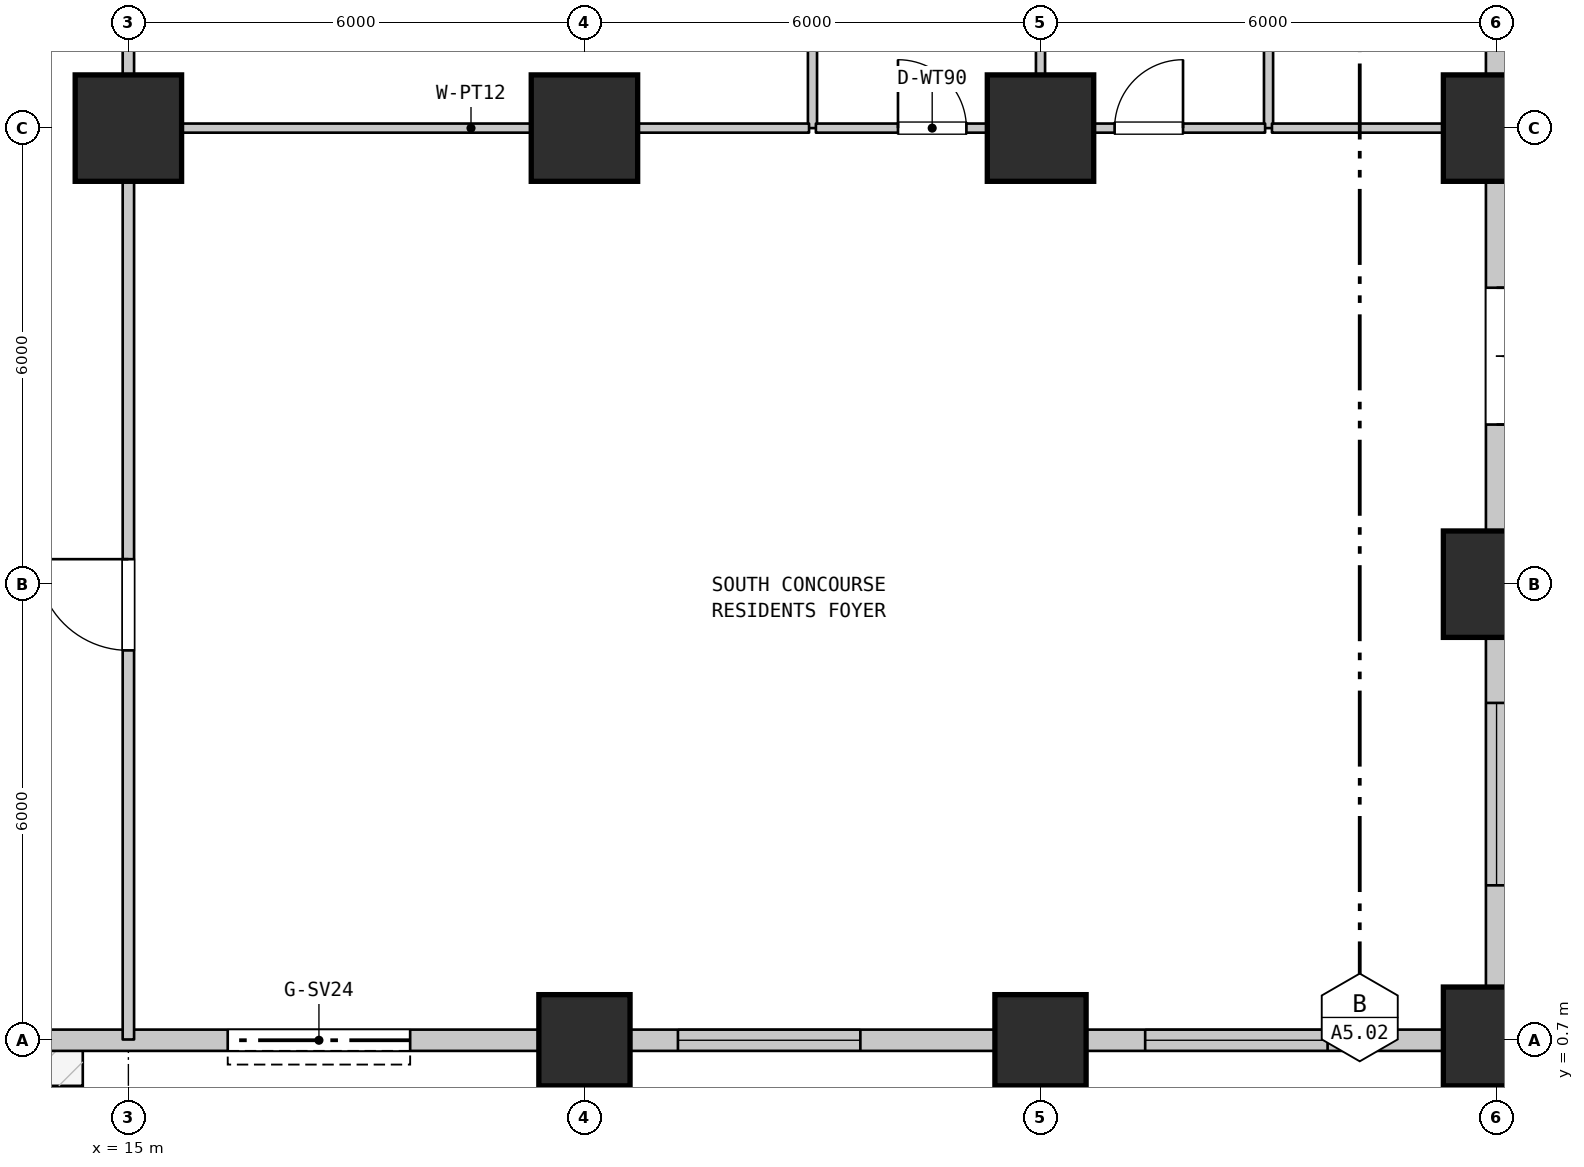
"""IFC4 building model, lengths in metres.
Left out: names, types, materials, properties, quantities, classifications, styles, units other than length and angle.
Written with IfcOpenShell. Run it as: python <this file> out.ifc"""

import sys

from ifc_helpers import new_model, si_unit, direction, frame, frame_2d, origin, origin_2d, place, context, subcontext, project, spatial, rectangle, extrude, element, fill, save


model = new_model("IFC4")
c1 = context("Model", 3, precision=1e-05, world=origin(), true_north=direction((0.0, 1.0)))
c2 = subcontext(c1, "Body", "Model", "MODEL_VIEW")
j1 = project(units=[si_unit("LENGTHUNIT", "METRE"), si_unit("PLANEANGLEUNIT", "RADIAN")], contexts=[c1])
p1 = place(None, origin())
s1 = spatial("IfcSite", under=j1, at=p1, CompositionType="ELEMENT")
p2 = place(p1, origin())
s2 = spatial("IfcBuilding", under=s1, at=p2, CompositionType="ELEMENT")
p3 = place(p2, origin())
s3 = spatial("IfcBuildingStorey", under=s2, at=p3, CompositionType="ELEMENT", Elevation=0.0)
p4 = place(p3, frame((15.0, 12.7, 0.0), z_axis=(0.0, 0.0, 1.0), x_axis=(1.0, 0.0, 0.0)))
e1 = element("IfcColumn", 1, at=p4, inside=s3, PredefinedType="COLUMN", context=c2, shape_type="SweptSolid", body=[
    extrude(rectangle(XDim=1.4, YDim=1.4, at=origin_2d()), origin(), (0.0, 0.0, 1.0), 6.5),
])
p5 = place(p3, frame((21.0, 0.7, 0.0), z_axis=(0.0, 0.0, 1.0), x_axis=(1.0, 0.0, 0.0)))
e2 = element("IfcColumn", 2, at=p5, inside=s3, PredefinedType="PILASTER", context=c2, shape_type="SweptSolid", body=[
    extrude(rectangle(XDim=1.2, YDim=1.2, at=origin_2d()), origin(), (0.0, 0.0, 1.0), 6.5),
])
p6 = place(p3, frame((21.0, 12.7, 0.0), z_axis=(0.0, 0.0, 1.0), x_axis=(1.0, 0.0, 0.0)))
e3 = element("IfcColumn", 3, at=p6, inside=s3, PredefinedType="COLUMN", context=c2, shape_type="SweptSolid", body=[
    extrude(rectangle(XDim=1.4, YDim=1.4, at=origin_2d()), origin(), (0.0, 0.0, 1.0), 6.5),
])
p7 = place(p3, frame((27.0, 0.7, 0.0), z_axis=(0.0, 0.0, 1.0), x_axis=(1.0, 0.0, 0.0)))
e4 = element("IfcColumn", 4, at=p7, inside=s3, PredefinedType="PILASTER", context=c2, shape_type="SweptSolid", body=[
    extrude(rectangle(XDim=1.2, YDim=1.2, at=origin_2d()), origin(), (0.0, 0.0, 1.0), 6.5),
])
p8 = place(p3, frame((27.0, 12.7, 0.0), z_axis=(0.0, 0.0, 1.0), x_axis=(1.0, 0.0, 0.0)))
e5 = element("IfcColumn", 5, at=p8, inside=s3, PredefinedType="COLUMN", context=c2, shape_type="SweptSolid", body=[
    extrude(rectangle(XDim=1.4, YDim=1.4, at=origin_2d()), origin(), (0.0, 0.0, 1.0), 6.5),
])
for number, where, z_axis, x_axis in (
    (6, (33.0, 0.7, 0.0), (0.0, 0.0, 1.0), (1.0, 0.0, 0.0)),
    (7, (33.0, 6.7, 0.0), (0.0, 0.0, 1.0), (1.0, 0.0, 0.0)),
    (8, (33.0, 12.7, 0.0), (0.0, 0.0, 1.0), (1.0, 0.0, 0.0)),
):
    element("IfcColumn", number, at=place(p3, frame(where, z_axis=z_axis, x_axis=x_axis)), inside=s3, PredefinedType="PILASTER", context=c2, shape_type="SweptSolid", body=[
        extrude(rectangle(XDim=1.4, YDim=1.4, at=origin_2d()), origin(), (0.0, 0.0, 1.0), 6.5),
    ])
p9 = place(p3, frame((33.0, 0.7, 0.0), z_axis=(0.0, 0.0, 1.0), x_axis=(-1.0, 0.0, 0.0)))
e9 = element("IfcWall", 9, at=p9, inside=s3, PredefinedType="STANDARD", context=c2, shape_type="SweptSolid", body=[
    extrude(rectangle(XDim=28.586, YDim=0.28, at=frame_2d((14.293, 0.0))), origin(), (0.0, 0.0, 1.0), 6.17),
])
p10 = place(p9, frame((19.2, 0.0, 0.0)))
e10 = element("IfcOpeningElement", 10, at=p10, cuts=e9, PredefinedType="OPENING", context=c2, shape_type="SweptSolid", body=[
    extrude(rectangle(XDim=1.8, YDim=2.4, at=frame_2d((0.9, 1.2))), frame((0.0, 0.15, 0.0), z_axis=(0.0, -1.0, 0.0), x_axis=(1.0, 0.0, 0.0)), (0.0, 0.0, 1.0), 0.3),
])
p11 = place(p9, frame((14.293, 0.0, 0.0)))
e11 = element("IfcOpeningElement", 11, at=p11, cuts=e9, PredefinedType="OPENING", context=c2, shape_type="SweptSolid", body=[
    extrude(rectangle(XDim=2.4, YDim=2.45, at=frame_2d((1.2, 1.225))), frame((0.0, 0.15, 0.0), z_axis=(0.0, -1.0, 0.0), x_axis=(1.0, 0.0, 0.0)), (0.0, 0.0, 1.0), 0.3),
])
p12 = place(p9, frame((2.223, 0.0, 0.9)))
e12 = element("IfcOpeningElement", 12, at=p12, cuts=e9, PredefinedType="OPENING", context=c2, shape_type="SweptSolid", body=[
    extrude(rectangle(XDim=2.4, YDim=2.4, at=frame_2d((1.2, 1.2))), frame((0.0, 0.15, 0.0), z_axis=(0.0, -1.0, 0.0), x_axis=(1.0, 0.0, 0.0)), (0.0, 0.0, 1.0), 0.3),
])
p13 = place(p9, frame((8.37, 0.0, 0.9)))
e13 = element("IfcOpeningElement", 13, at=p13, cuts=e9, PredefinedType="OPENING", context=c2, shape_type="SweptSolid", body=[
    extrude(rectangle(XDim=2.4, YDim=2.4, at=frame_2d((1.2, 1.2))), frame((0.0, 0.15, 0.0), z_axis=(0.0, -1.0, 0.0), x_axis=(1.0, 0.0, 0.0)), (0.0, 0.0, 1.0), 0.3),
])
p14 = place(p9, frame((23.513, 0.0, 0.9)))
e14 = element("IfcOpeningElement", 14, at=p14, cuts=e9, PredefinedType="OPENING", context=c2, shape_type="SweptSolid", body=[
    extrude(rectangle(XDim=2.4, YDim=2.4, at=frame_2d((1.2, 1.2))), frame((0.0, 0.15, 0.0), z_axis=(0.0, -1.0, 0.0), x_axis=(1.0, 0.0, 0.0)), (0.0, 0.0, 1.0), 0.3),
])
p15 = place(p3, frame((15.0, 0.71, 0.0), z_axis=(0.0, 0.0, 1.0), x_axis=(0.0, 1.0, 0.0)))
e15 = element("IfcWall", 15, at=p15, inside=s3, PredefinedType="STANDARD", context=c2, shape_type="SweptSolid", body=[
    extrude(rectangle(XDim=11.99, YDim=0.15, at=frame_2d((5.995, 0.0))), origin(), (0.0, 0.0, 1.0), 6.17),
])
p16 = place(p15, frame((5.119, 0.0, 0.0)))
e16 = element("IfcOpeningElement", 16, at=p16, cuts=e15, PredefinedType="OPENING", context=c2, shape_type="SweptSolid", body=[
    extrude(rectangle(XDim=1.2, YDim=2.2, at=frame_2d((0.6, 1.1))), frame((0.0, 0.085, 0.0), z_axis=(0.0, -1.0, 0.0), x_axis=(1.0, 0.0, 0.0)), (0.0, 0.0, 1.0), 0.17),
])
p17 = place(p3, frame((15.0, 12.7, 0.0), z_axis=(0.0, 0.0, 1.0), x_axis=(0.0, 1.0, 0.0)))
e17 = element("IfcWall", 17, at=p17, inside=s3, PredefinedType="STANDARD", context=c2, shape_type="SweptSolid", body=[
    extrude(rectangle(XDim=6.8, YDim=0.15, at=frame_2d((3.4, 0.0))), origin(), (0.0, 0.0, 1.0), 5.67),
])
for number, where, z_axis, x_axis in (
    (18, (24.0, 12.7, 0.0), (0.0, 0.0, 1.0), (0.0, 1.0, 0.0)),
    (19, (27.0, 12.7, 0.0), (0.0, 0.0, 1.0), (0.0, 1.0, 0.0)),
    (20, (30.0, 12.7, 0.0), (0.0, 0.0, 1.0), (0.0, 1.0, 0.0)),
):
    element("IfcWall", number, at=place(p3, frame(where, z_axis=z_axis, x_axis=x_axis)), inside=s3, PredefinedType="PARTITIONING", context=c2, shape_type="SweptSolid", body=[
        extrude(rectangle(XDim=6.8, YDim=0.12, at=frame_2d((3.4, 0.0))), origin(), (0.0, 0.0, 1.0), 6.17),
    ])
p18 = place(p3, frame((15.06, 12.7, 0.0), z_axis=(0.0, 0.0, 1.0), x_axis=(1.0, 0.0, 0.0)))
e21 = element("IfcWall", 21, at=p18, inside=s3, PredefinedType="PARTITIONING", context=c2, shape_type="SweptSolid", body=[
    extrude(rectangle(XDim=8.895, YDim=0.12, at=frame_2d((4.448, 0.0))), origin(), (0.0, 0.0, 1.0), 6.17),
])
p19 = place(p3, frame((24.045, 12.7, 0.0), z_axis=(0.0, 0.0, 1.0), x_axis=(1.0, 0.0, 0.0)))
e22 = element("IfcWall", 22, at=p19, inside=s3, PredefinedType="PARTITIONING", context=c2, shape_type="SweptSolid", body=[
    extrude(rectangle(XDim=5.91, YDim=0.12, at=frame_2d((2.955, 0.0))), origin(), (0.0, 0.0, 1.0), 6.17),
])
p20 = place(p19, frame((1.08, 0.0, 0.0)))
e23 = element("IfcOpeningElement", 23, at=p20, cuts=e22, PredefinedType="OPENING", context=c2, shape_type="SweptSolid", body=[
    extrude(rectangle(XDim=0.9, YDim=2.1, at=frame_2d((0.45, 1.05))), frame((0.0, 0.07, 0.0), z_axis=(0.0, -1.0, 0.0), x_axis=(1.0, 0.0, 0.0)), (0.0, 0.0, 1.0), 0.14),
])
p21 = place(p19, frame((3.93, 0.0, 0.0)))
e24 = element("IfcOpeningElement", 24, at=p21, cuts=e22, PredefinedType="OPENING", context=c2, shape_type="SweptSolid", body=[
    extrude(rectangle(XDim=0.9, YDim=2.1, at=frame_2d((0.45, 1.05))), frame((0.0, 0.07, 0.0), z_axis=(0.0, -1.0, 0.0), x_axis=(1.0, 0.0, 0.0)), (0.0, 0.0, 1.0), 0.14),
])
p22 = place(p3, frame((30.045, 12.7, 0.0), z_axis=(0.0, 0.0, 1.0), x_axis=(1.0, 0.0, 0.0)))
e25 = element("IfcWall", 25, at=p22, inside=s3, PredefinedType="PARTITIONING", context=c2, shape_type="SweptSolid", body=[
    extrude(rectangle(XDim=2.945, YDim=0.12, at=frame_2d((1.473, 0.0))), origin(), (0.0, 0.0, 1.0), 6.17),
])
p23 = place(p3, frame((33.0, 27.9, 0.0), z_axis=(0.0, 0.0, 1.0), x_axis=(0.0, -1.0, 0.0)))
e26 = element("IfcWall", 26, at=p23, inside=s3, PredefinedType="STANDARD", context=c2, shape_type="SweptSolid", body=[
    extrude(rectangle(XDim=27.2, YDim=0.28, at=frame_2d((13.6, 0.0))), origin(), (0.0, 0.0, 1.0), 5.67),
])
p24 = place(p23, frame((17.3, 0.0, 0.0)))
e27 = element("IfcOpeningElement", 27, at=p24, cuts=e26, PredefinedType="OPENING", context=c2, shape_type="SweptSolid", body=[
    extrude(rectangle(XDim=1.8, YDim=2.4, at=frame_2d((0.9, 1.2))), frame((0.0, 0.15, 0.0), z_axis=(0.0, -1.0, 0.0), x_axis=(1.0, 0.0, 0.0)), (0.0, 0.0, 1.0), 0.3),
])
p25 = place(p23, frame((6.4, 0.0, 0.0)))
e28 = element("IfcOpeningElement", 28, at=p25, cuts=e26, PredefinedType="OPENING", context=c2, shape_type="SweptSolid", body=[
    extrude(rectangle(XDim=1.8, YDim=2.4, at=frame_2d((0.9, 1.2))), frame((0.0, 0.15, 0.0), z_axis=(0.0, -1.0, 0.0), x_axis=(1.0, 0.0, 0.0)), (0.0, 0.0, 1.0), 0.3),
])
p26 = place(p23, frame((1.338, 0.0, 0.9)))
e29 = element("IfcOpeningElement", 29, at=p26, cuts=e26, PredefinedType="OPENING", context=c2, shape_type="SweptSolid", body=[
    extrude(rectangle(XDim=2.4, YDim=2.4, at=frame_2d((1.2, 1.2))), frame((0.0, 0.15, 0.0), z_axis=(0.0, -1.0, 0.0), x_axis=(1.0, 0.0, 0.0)), (0.0, 0.0, 1.0), 0.3),
])
p27 = place(p23, frame((22.762, 0.0, 0.9)))
e30 = element("IfcOpeningElement", 30, at=p27, cuts=e26, PredefinedType="OPENING", context=c2, shape_type="SweptSolid", body=[
    extrude(rectangle(XDim=2.4, YDim=2.4, at=frame_2d((1.2, 1.2))), frame((0.0, 0.15, 0.0), z_axis=(0.0, -1.0, 0.0), x_axis=(1.0, 0.0, 0.0)), (0.0, 0.0, 1.0), 0.3),
])
p28 = place(p24, origin())
e31 = element("IfcDoor", 31, at=p28, inside=s3, OperationType="DOUBLE_DOOR_SINGLE_SWING", PredefinedType="DOOR", context=c2, shape_type="SweptSolid", body=[
    extrude(rectangle(XDim=1.8, YDim=2.4, at=frame_2d((0.9, 1.2))), frame((0.0, 0.025, 0.0), z_axis=(0.0, -1.0, 0.0), x_axis=(1.0, 0.0, 0.0)), (0.0, 0.0, 1.0), 0.05),
])
fill(e27, e31)
p29 = place(p27, origin())
e32 = element("IfcWindow", 32, at=p29, inside=s3, PartitioningType="DOUBLE_PANEL_VERTICAL", PredefinedType="WINDOW", context=c2, shape_type="SweptSolid", body=[
    extrude(rectangle(XDim=2.4, YDim=2.4, at=frame_2d((1.2, 1.2))), frame((0.0, 0.03, 0.0), z_axis=(0.0, -1.0, 0.0), x_axis=(1.0, 0.0, 0.0)), (0.0, 0.0, 1.0), 0.06),
])
fill(e30, e32)
p30 = place(p11, origin())
e33 = element("IfcDoor", 33, at=p30, inside=s3, OperationType="ROLLINGUP", PredefinedType="GATE", context=c2, shape_type="SweptSolid", body=[
    extrude(rectangle(XDim=2.4, YDim=2.45, at=frame_2d((1.2, 1.225))), frame((0.0, 0.025, 0.0), z_axis=(0.0, -1.0, 0.0), x_axis=(1.0, 0.0, 0.0)), (0.0, 0.0, 1.0), 0.05),
])
fill(e11, e33)
p31 = place(p12, origin())
e34 = element("IfcWindow", 34, at=p31, inside=s3, PartitioningType="DOUBLE_PANEL_VERTICAL", PredefinedType="WINDOW", context=c2, shape_type="SweptSolid", body=[
    extrude(rectangle(XDim=2.4, YDim=2.4, at=frame_2d((1.2, 1.2))), frame((0.0, 0.03, 0.0), z_axis=(0.0, -1.0, 0.0), x_axis=(1.0, 0.0, 0.0)), (0.0, 0.0, 1.0), 0.06),
])
fill(e12, e34)
p32 = place(p13, origin())
e35 = element("IfcWindow", 35, at=p32, inside=s3, PartitioningType="DOUBLE_PANEL_VERTICAL", PredefinedType="WINDOW", context=c2, shape_type="SweptSolid", body=[
    extrude(rectangle(XDim=2.4, YDim=2.4, at=frame_2d((1.2, 1.2))), frame((0.0, 0.03, 0.0), z_axis=(0.0, -1.0, 0.0), x_axis=(1.0, 0.0, 0.0)), (0.0, 0.0, 1.0), 0.06),
])
fill(e13, e35)
p33 = place(p16, origin())
e36 = element("IfcDoor", 36, at=p33, inside=s3, OperationType="SINGLE_SWING_RIGHT", PredefinedType="DOOR", context=c2, shape_type="SweptSolid", body=[
    extrude(rectangle(XDim=1.2, YDim=2.2, at=frame_2d((0.6, 1.1))), frame((0.0, 0.025, 0.0), z_axis=(0.0, -1.0, 0.0), x_axis=(1.0, 0.0, 0.0)), (0.0, 0.0, 1.0), 0.05),
])
fill(e16, e36)
p34 = place(p20, origin())
e37 = element("IfcDoor", 37, at=p34, inside=s3, OperationType="SINGLE_SWING_LEFT", PredefinedType="DOOR", context=c2, shape_type="SweptSolid", body=[
    extrude(rectangle(XDim=0.9, YDim=2.1, at=frame_2d((0.45, 1.05))), frame((0.0, 0.025, 0.0), z_axis=(0.0, -1.0, 0.0), x_axis=(1.0, 0.0, 0.0)), (0.0, 0.0, 1.0), 0.05),
])
fill(e23, e37)
p35 = place(p21, origin())
e38 = element("IfcDoor", 38, at=p35, inside=s3, OperationType="SINGLE_SWING_RIGHT", PredefinedType="DOOR", context=c2, shape_type="SweptSolid", body=[
    extrude(rectangle(XDim=0.9, YDim=2.1, at=frame_2d((0.45, 1.05))), frame((0.0, 0.025, 0.0), z_axis=(0.0, -1.0, 0.0), x_axis=(1.0, 0.0, 0.0)), (0.0, 0.0, 1.0), 0.05),
])
fill(e24, e38)
save(model, sys.argv[1])
